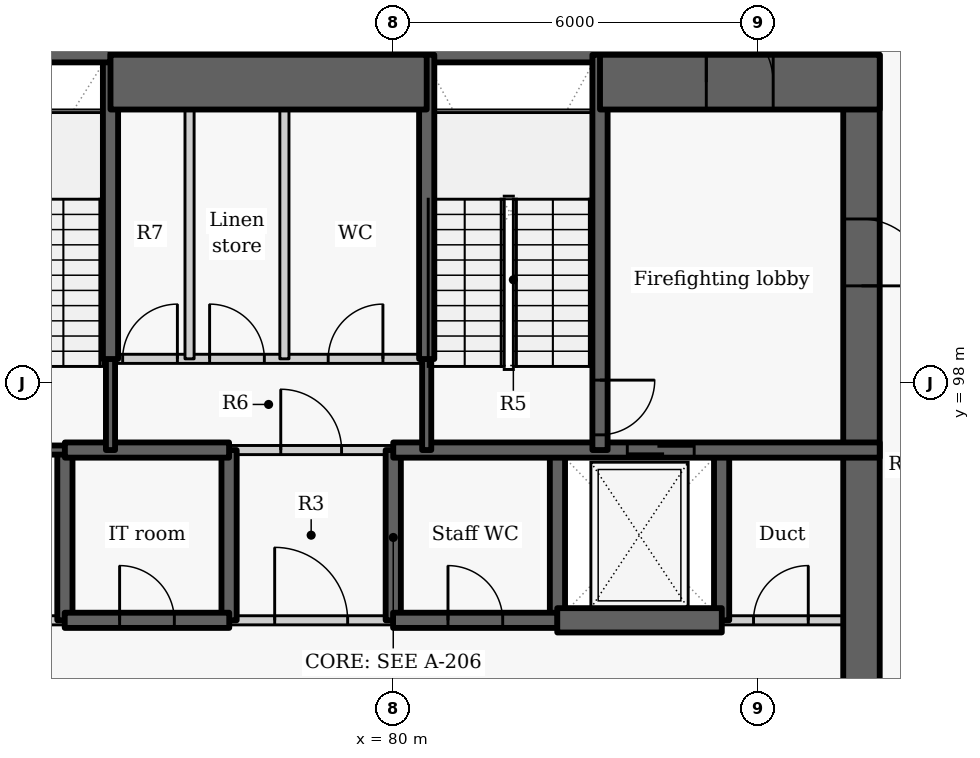
"""IFC4 building model, lengths in metres.
Left out: names, types, materials, properties, quantities, classifications, styles, units other than length and angle.
Written with IfcOpenShell. Run it as: python <this file> out.ifc"""

import sys

from ifc_helpers import new_model, si_unit, direction, frame, frame_2d, origin, place, context, subcontext, project, spatial, rectangle, extrude, element, fill, save


model = new_model("IFC4")
c1 = context("Model", 3, precision=1e-05, world=origin(), true_north=direction((0.0, 1.0)))
c2 = subcontext(c1, "Body", "Model", "MODEL_VIEW")
j1 = project(units=[si_unit("LENGTHUNIT", "METRE"), si_unit("PLANEANGLEUNIT", "RADIAN")], contexts=[c1])
p1 = place(None, origin())
s1 = spatial("IfcSite", under=j1, at=p1, CompositionType="ELEMENT")
p2 = place(p1, origin())
s2 = spatial("IfcBuilding", under=s1, at=p2, CompositionType="ELEMENT")
p3 = place(p2, frame((0.0, 0.0, 24.0)))
s3 = spatial("IfcBuildingStorey", under=s2, at=p3, CompositionType="ELEMENT", Elevation=24.0)
for number, where, z_axis, x_axis in (
    (1, (74.6, 94.1, -0.3), (0.0, 0.0, 1.0), (0.0, 1.0, 0.0)),
    (2, (77.3, 94.1, -0.3), (0.0, 0.0, 1.0), (0.0, 1.0, 0.0)),
    (3, (80.0, 94.1, -0.3), (0.0, 0.0, 1.0), (0.0, 1.0, 0.0)),
    (4, (82.7, 94.1, -0.3), (0.0, 0.0, 1.0), (0.0, 1.0, 0.0)),
    (5, (85.4, 94.1, -0.3), (0.0, 0.0, 1.0), (0.0, 1.0, 0.0)),
):
    element("IfcWall", number, at=place(p3, frame(where, z_axis=z_axis, x_axis=x_axis)), inside=s3, PredefinedType="SHEAR", context=c2, shape_type="SweptSolid", body=[
        extrude(rectangle(XDim=2.8, YDim=0.25, at=frame_2d((1.4, 0.0))), origin(), (0.0, 0.0, 1.0), 4.225),
    ])
p4 = place(p3, frame((87.7, 103.4, -0.3), z_axis=(0.0, 0.0, 1.0), x_axis=(0.0, -1.0, 0.0)))
e6 = element("IfcWall", 6, at=p4, inside=s3, PredefinedType="SHEAR", context=c2, shape_type="SweptSolid", body=[
    extrude(rectangle(XDim=15.6, YDim=0.6, at=frame_2d((7.8, 0.0))), origin(), (0.0, 0.0, 1.0), 4.225),
])
p5 = place(p4, frame((2.7, 0.0, 0.3)))
e7 = element("IfcOpeningElement", 7, at=p5, cuts=e6, PredefinedType="OPENING", context=c2, shape_type="SweptSolid", body=[
    extrude(rectangle(XDim=1.1, YDim=2.1, at=frame_2d((0.55, 1.05))), frame((0.0, 0.31, 0.0), z_axis=(0.0, -1.0, 0.0), x_axis=(1.0, 0.0, 0.0)), (0.0, 0.0, 1.0), 0.62),
])
p6 = place(p3, frame((72.0, 94.1, 0.0), z_axis=(0.0, 0.0, 1.0), x_axis=(1.0, 0.0, 0.0)))
e8 = element("IfcWall", 8, at=p6, inside=s3, PredefinedType="PARTITIONING", context=c2, shape_type="SweptSolid", body=[
    extrude(rectangle(XDim=2.603, YDim=0.15, at=frame_2d((1.302, 0.0))), origin(), (0.0, 0.0, 1.0), 3.925),
])
p7 = place(p6, frame((1.075, 0.0, 0.0)))
e9 = element("IfcOpeningElement", 9, at=p7, cuts=e8, PredefinedType="OPENING", context=c2, shape_type="SweptSolid", body=[
    extrude(rectangle(XDim=1.1, YDim=2.1, at=frame_2d((0.55, 1.05))), frame((0.0, 0.085, 0.0), z_axis=(0.0, -1.0, 0.0), x_axis=(1.0, 0.0, 0.0)), (0.0, 0.0, 1.0), 0.17),
])
p8 = place(p3, frame((77.297, 94.1, 0.0), z_axis=(0.0, 0.0, 1.0), x_axis=(1.0, 0.0, 0.0)))
e10 = element("IfcWall", 10, at=p8, inside=s3, PredefinedType="PARTITIONING", context=c2, shape_type="SweptSolid", body=[
    extrude(rectangle(XDim=2.706, YDim=0.15, at=frame_2d((1.353, 0.0))), origin(), (0.0, 0.0, 1.0), 3.925),
])
p9 = place(p8, frame((0.753, 0.0, 0.0)))
e11 = element("IfcOpeningElement", 11, at=p9, cuts=e10, PredefinedType="OPENING", context=c2, shape_type="SweptSolid", body=[
    extrude(rectangle(XDim=1.2, YDim=2.1, at=frame_2d((0.6, 1.05))), frame((0.0, 0.085, 0.0), z_axis=(0.0, -1.0, 0.0), x_axis=(1.0, 0.0, 0.0)), (0.0, 0.0, 1.0), 0.17),
])
p10 = place(p3, frame((85.397, 94.1, 0.0), z_axis=(0.0, 0.0, 1.0), x_axis=(1.0, 0.0, 0.0)))
e12 = element("IfcWall", 12, at=p10, inside=s3, PredefinedType="PARTITIONING", context=c2, shape_type="SweptSolid", body=[
    extrude(rectangle(XDim=2.603, YDim=0.15, at=frame_2d((1.302, 0.0))), origin(), (0.0, 0.0, 1.0), 3.925),
])
p11 = place(p10, frame((0.528, 0.0, 0.0)))
e13 = element("IfcOpeningElement", 13, at=p11, cuts=e12, PredefinedType="OPENING", context=c2, shape_type="SweptSolid", body=[
    extrude(rectangle(XDim=0.9, YDim=2.1, at=frame_2d((0.45, 1.05))), frame((0.0, 0.085, 0.0), z_axis=(0.0, -1.0, 0.0), x_axis=(1.0, 0.0, 0.0)), (0.0, 0.0, 1.0), 0.17),
])
p12 = place(p3, frame((74.597, 94.1, -0.3), z_axis=(0.0, 0.0, 1.0), x_axis=(1.0, 0.0, 0.0)))
e14 = element("IfcWall", 14, at=p12, inside=s3, PredefinedType="SHEAR", context=c2, shape_type="SweptSolid", body=[
    extrude(rectangle(XDim=2.706, YDim=0.25, at=frame_2d((1.353, 0.0))), origin(), (0.0, 0.0, 1.0), 4.225),
])
p13 = place(p12, frame((0.903, 0.0, 0.3)))
e15 = element("IfcOpeningElement", 15, at=p13, cuts=e14, PredefinedType="OPENING", context=c2, shape_type="SweptSolid", body=[
    extrude(rectangle(XDim=0.9, YDim=2.1, at=frame_2d((0.45, 1.05))), frame((0.0, 0.135, 0.0), z_axis=(0.0, -1.0, 0.0), x_axis=(1.0, 0.0, 0.0)), (0.0, 0.0, 1.0), 0.27),
])
p14 = place(p3, frame((79.997, 94.1, -0.3), z_axis=(0.0, 0.0, 1.0), x_axis=(1.0, 0.0, 0.0)))
e16 = element("IfcWall", 16, at=p14, inside=s3, PredefinedType="SHEAR", context=c2, shape_type="SweptSolid", body=[
    extrude(rectangle(XDim=2.706, YDim=0.25, at=frame_2d((1.353, 0.0))), origin(), (0.0, 0.0, 1.0), 4.225),
])
p15 = place(p14, frame((0.903, 0.0, 0.3)))
e17 = element("IfcOpeningElement", 17, at=p15, cuts=e16, PredefinedType="OPENING", context=c2, shape_type="SweptSolid", body=[
    extrude(rectangle(XDim=0.9, YDim=2.1, at=frame_2d((0.45, 1.05))), frame((0.0, 0.135, 0.0), z_axis=(0.0, -1.0, 0.0), x_axis=(1.0, 0.0, 0.0)), (0.0, 0.0, 1.0), 0.27),
])
p16 = place(p3, frame((82.697, 94.1, -0.3), z_axis=(0.0, 0.0, 1.0), x_axis=(1.0, 0.0, 0.0)))
e18 = element("IfcWall", 18, at=p16, inside=s3, PredefinedType="SHEAR", context=c2, shape_type="SweptSolid", body=[
    extrude(rectangle(XDim=2.706, YDim=0.4, at=frame_2d((1.353, 0.0))), origin(), (0.0, 0.0, 1.0), 4.225),
])
p17 = place(p3, frame((74.6, 96.9, -0.3), z_axis=(0.0, 0.0, 1.0), x_axis=(-1.0, 0.0, 0.0)))
e19 = element("IfcWall", 19, at=p17, inside=s3, PredefinedType="SHEAR", context=c2, shape_type="SweptSolid", body=[
    extrude(rectangle(XDim=2.6, YDim=0.15, at=frame_2d((1.3, 0.0))), origin(), (0.0, 0.0, 1.0), 4.225),
])
p18 = place(p17, frame((0.37, 0.0, 0.3)))
e20 = element("IfcOpeningElement", 20, at=p18, cuts=e19, PredefinedType="OPENING", context=c2, shape_type="SweptSolid", body=[
    extrude(rectangle(XDim=1.1, YDim=2.1, at=frame_2d((0.55, 1.05))), frame((0.0, 0.085, 0.0), z_axis=(0.0, -1.0, 0.0), x_axis=(1.0, 0.0, 0.0)), (0.0, 0.0, 1.0), 0.17),
])
p19 = place(p3, frame((74.6, 96.9, -0.3), z_axis=(0.0, 0.0, 1.0), x_axis=(1.0, 0.0, 0.0)))
e21 = element("IfcWall", 21, at=p19, inside=s3, PredefinedType="SHEAR", context=c2, shape_type="SweptSolid", body=[
    extrude(rectangle(XDim=2.7, YDim=0.25, at=frame_2d((1.35, 0.0))), origin(), (0.0, 0.0, 1.0), 4.225),
])
p20 = place(p3, frame((80.0, 96.9, -0.3), z_axis=(0.0, 0.0, 1.0), x_axis=(1.0, 0.0, 0.0)))
e22 = element("IfcWall", 22, at=p20, inside=s3, PredefinedType="SHEAR", context=c2, shape_type="SweptSolid", body=[
    extrude(rectangle(XDim=8.0, YDim=0.25, at=frame_2d((4.0, 0.0))), origin(), (0.0, 0.0, 1.0), 4.225),
])
p21 = place(p20, frame((3.849, 0.0, 0.3)))
e23 = element("IfcOpeningElement", 23, at=p21, cuts=e22, PredefinedType="OPENING", context=c2, shape_type="SweptSolid", body=[
    extrude(rectangle(XDim=1.1, YDim=2.1, at=frame_2d((0.55, 1.05))), frame((0.0, 0.135, 0.0), z_axis=(0.0, -1.0, 0.0), x_axis=(1.0, 0.0, 0.0)), (0.0, 0.0, 1.0), 0.27),
])
p22 = place(p3, frame((77.3, 96.9, 0.0), z_axis=(0.0, 0.0, 1.0), x_axis=(1.0, 0.0, 0.0)))
e24 = element("IfcWall", 24, at=p22, inside=s3, PredefinedType="PARTITIONING", context=c2, shape_type="SweptSolid", body=[
    extrude(rectangle(XDim=2.7, YDim=0.15, at=frame_2d((1.35, 0.0))), origin(), (0.0, 0.0, 1.0), 3.925),
])
p23 = place(p22, frame((0.85, 0.0, 0.0)))
e25 = element("IfcOpeningElement", 25, at=p23, cuts=e24, PredefinedType="OPENING", context=c2, shape_type="SweptSolid", body=[
    extrude(rectangle(XDim=1.0, YDim=2.1, at=frame_2d((0.5, 1.05))), frame((0.0, 0.085, 0.0), z_axis=(0.0, -1.0, 0.0), x_axis=(1.0, 0.0, 0.0)), (0.0, 0.0, 1.0), 0.17),
])
p24 = place(p3, frame((75.35, 96.9, -0.3), z_axis=(0.0, 0.0, 1.0), x_axis=(0.0, 1.0, 0.0)))
e26 = element("IfcWall", 26, at=p24, inside=s3, PredefinedType="SHEAR", context=c2, shape_type="SweptSolid", body=[
    extrude(rectangle(XDim=1.503, YDim=0.15, at=frame_2d((0.751, 0.0))), origin(), (0.0, 0.0, 1.0), 4.225),
])
p25 = place(p3, frame((75.35, 98.397, -0.3), z_axis=(0.0, 0.0, 1.0), x_axis=(0.0, 1.0, 0.0)))
e27 = element("IfcWall", 27, at=p25, inside=s3, PredefinedType="SHEAR", context=c2, shape_type="SweptSolid", body=[
    extrude(rectangle(XDim=5.003, YDim=0.25, at=frame_2d((2.501, 0.0))), origin(), (0.0, 0.0, 1.0), 4.225),
])
p26 = place(p3, frame((72.0, 103.4, -0.3), z_axis=(0.0, 0.0, 1.0), x_axis=(1.0, 0.0, 0.0)))
e28 = element("IfcWall", 28, at=p26, inside=s3, PredefinedType="SHEAR", context=c2, shape_type="SweptSolid", body=[
    extrude(rectangle(XDim=3.35, YDim=0.25, at=frame_2d((1.675, 0.0))), origin(), (0.0, 0.0, 1.0), 4.225),
])
p27 = place(p3, frame((80.55, 103.4, -0.3), z_axis=(0.0, 0.0, 1.0), x_axis=(1.0, 0.0, 0.0)))
e29 = element("IfcWall", 29, at=p27, inside=s3, PredefinedType="SHEAR", context=c2, shape_type="SweptSolid", body=[
    extrude(rectangle(XDim=2.85, YDim=0.25, at=frame_2d((1.425, 0.0))), origin(), (0.0, 0.0, 1.0), 4.225),
])
p28 = place(p3, frame((83.4, 103.4, -0.3), z_axis=(0.0, 0.0, 1.0), x_axis=(0.0, -1.0, 0.0)))
e30 = element("IfcWall", 30, at=p28, inside=s3, PredefinedType="SHEAR", context=c2, shape_type="SweptSolid", body=[
    extrude(rectangle(XDim=6.5, YDim=0.25, at=frame_2d((3.25, 0.0))), origin(), (0.0, 0.0, 1.0), 4.225),
])
p29 = place(p28, frame((5.35, 0.0, 0.3)))
e31 = element("IfcOpeningElement", 31, at=p29, cuts=e30, PredefinedType="OPENING", context=c2, shape_type="SweptSolid", body=[
    extrude(rectangle(XDim=0.9, YDim=2.1, at=frame_2d((0.45, 1.05))), frame((0.0, 0.135, 0.0), z_axis=(0.0, -1.0, 0.0), x_axis=(1.0, 0.0, 0.0)), (0.0, 0.0, 1.0), 0.27),
])
p30 = place(p3, frame((80.55, 96.9, -0.3), z_axis=(0.0, 0.0, 1.0), x_axis=(0.0, 1.0, 0.0)))
e32 = element("IfcWall", 32, at=p30, inside=s3, PredefinedType="SHEAR", context=c2, shape_type="SweptSolid", body=[
    extrude(rectangle(XDim=1.503, YDim=0.15, at=frame_2d((0.751, 0.0))), origin(), (0.0, 0.0, 1.0), 4.225),
])
p31 = place(p3, frame((80.55, 98.397, -0.3), z_axis=(0.0, 0.0, 1.0), x_axis=(0.0, 1.0, 0.0)))
e33 = element("IfcWall", 33, at=p31, inside=s3, PredefinedType="SHEAR", context=c2, shape_type="SweptSolid", body=[
    extrude(rectangle(XDim=5.003, YDim=0.25, at=frame_2d((2.501, 0.0))), origin(), (0.0, 0.0, 1.0), 4.225),
])
p32 = place(p3, frame((75.35, 102.95, -0.3), z_axis=(0.0, 0.0, 1.0), x_axis=(1.0, 0.0, 0.0)))
e34 = element("IfcWall", 34, at=p32, inside=s3, PredefinedType="SHEAR", context=c2, shape_type="SweptSolid", body=[
    extrude(rectangle(XDim=5.2, YDim=0.9, at=frame_2d((2.6, 0.0))), origin(), (0.0, 0.0, 1.0), 4.225),
])
p33 = place(p3, frame((83.4, 102.95, -0.3), z_axis=(0.0, 0.0, 1.0), x_axis=(1.0, 0.0, 0.0)))
e35 = element("IfcWall", 35, at=p33, inside=s3, PredefinedType="SHEAR", context=c2, shape_type="SweptSolid", body=[
    extrude(rectangle(XDim=4.6, YDim=0.9, at=frame_2d((2.3, 0.0))), origin(), (0.0, 0.0, 1.0), 4.225),
])
p34 = place(p33, frame((1.748, 0.0, 0.3)))
e36 = element("IfcOpeningElement", 36, at=p34, cuts=e35, PredefinedType="OPENING", context=c2, shape_type="SweptSolid", body=[
    extrude(rectangle(XDim=1.1, YDim=2.1, at=frame_2d((0.55, 1.05))), frame((0.0, 0.46, 0.0), z_axis=(0.0, -1.0, 0.0), x_axis=(1.0, 0.0, 0.0)), (0.0, 0.0, 1.0), 0.92),
])
p35 = place(p3, frame((75.35, 98.4, 0.0), z_axis=(0.0, 0.0, 1.0), x_axis=(1.0, 0.0, 0.0)))
e37 = element("IfcWall", 37, at=p35, inside=s3, PredefinedType="PARTITIONING", context=c2, shape_type="SweptSolid", body=[
    extrude(rectangle(XDim=5.2, YDim=0.15, at=frame_2d((2.6, 0.0))), origin(), (0.0, 0.0, 1.0), 3.925),
])
p36 = place(p35, frame((0.2, 0.0, 0.0)))
e38 = element("IfcOpeningElement", 38, at=p36, cuts=e37, PredefinedType="OPENING", context=c2, shape_type="SweptSolid", body=[
    extrude(rectangle(XDim=0.9, YDim=2.1, at=frame_2d((0.45, 1.05))), frame((0.0, 0.085, 0.0), z_axis=(0.0, -1.0, 0.0), x_axis=(1.0, 0.0, 0.0)), (0.0, 0.0, 1.0), 0.17),
])
p37 = place(p35, frame((1.63, 0.0, 0.0)))
e39 = element("IfcOpeningElement", 39, at=p37, cuts=e37, PredefinedType="OPENING", context=c2, shape_type="SweptSolid", body=[
    extrude(rectangle(XDim=0.9, YDim=2.1, at=frame_2d((0.45, 1.05))), frame((0.0, 0.085, 0.0), z_axis=(0.0, -1.0, 0.0), x_axis=(1.0, 0.0, 0.0)), (0.0, 0.0, 1.0), 0.17),
])
p38 = place(p35, frame((3.58, 0.0, 0.0)))
e40 = element("IfcOpeningElement", 40, at=p38, cuts=e37, PredefinedType="OPENING", context=c2, shape_type="SweptSolid", body=[
    extrude(rectangle(XDim=0.9, YDim=2.1, at=frame_2d((0.45, 1.05))), frame((0.0, 0.085, 0.0), z_axis=(0.0, -1.0, 0.0), x_axis=(1.0, 0.0, 0.0)), (0.0, 0.0, 1.0), 0.17),
])
for number, where, z_axis, x_axis in (
    (41, (76.65, 98.4, 0.0), (0.0, 0.0, 1.0), (0.0, 1.0, 0.0)),
    (42, (78.21, 98.4, 0.0), (0.0, 0.0, 1.0), (0.0, 1.0, 0.0)),
):
    element("IfcWall", number, at=place(p3, frame(where, z_axis=z_axis, x_axis=x_axis)), inside=s3, PredefinedType="PARTITIONING", context=c2, shape_type="SweptSolid", body=[
        extrude(rectangle(XDim=5.0, YDim=0.15, at=frame_2d((2.5, 0.0))), origin(), (0.0, 0.0, 1.0), 3.925),
    ])
p39 = place(p13, origin())
e43 = element("IfcDoor", 43, at=p39, inside=s3, OperationType="SINGLE_SWING_LEFT", PredefinedType="DOOR", context=c2, shape_type="SweptSolid", body=[
    extrude(rectangle(XDim=0.9, YDim=2.1, at=frame_2d((0.45, 1.05))), frame((0.0, 0.025, 0.0), z_axis=(0.0, -1.0, 0.0), x_axis=(1.0, 0.0, 0.0)), (0.0, 0.0, 1.0), 0.05),
])
fill(e15, e43)
p40 = place(p9, origin())
e44 = element("IfcDoor", 44, at=p40, inside=s3, OperationType="DOUBLE_DOOR_SINGLE_SWING", PredefinedType="DOOR", context=c2, shape_type="SweptSolid", body=[
    extrude(rectangle(XDim=1.2, YDim=2.1, at=frame_2d((0.6, 1.05))), frame((0.0, 0.025, 0.0), z_axis=(0.0, -1.0, 0.0), x_axis=(1.0, 0.0, 0.0)), (0.0, 0.0, 1.0), 0.05),
])
fill(e11, e44)
p41 = place(p15, origin())
e45 = element("IfcDoor", 45, at=p41, inside=s3, OperationType="SINGLE_SWING_LEFT", PredefinedType="DOOR", context=c2, shape_type="SweptSolid", body=[
    extrude(rectangle(XDim=0.9, YDim=2.1, at=frame_2d((0.45, 1.05))), frame((0.0, 0.025, 0.0), z_axis=(0.0, -1.0, 0.0), x_axis=(1.0, 0.0, 0.0)), (0.0, 0.0, 1.0), 0.05),
])
fill(e17, e45)
p42 = place(p21, origin())
e46 = element("IfcDoor", 46, at=p42, inside=s3, OperationType="SLIDING_TO_LEFT", PredefinedType="DOOR", context=c2, shape_type="SweptSolid", body=[
    extrude(rectangle(XDim=1.1, YDim=2.1, at=frame_2d((0.55, 1.05))), frame((0.0, 0.025, 0.0), z_axis=(0.0, -1.0, 0.0), x_axis=(1.0, 0.0, 0.0)), (0.0, 0.0, 1.0), 0.05),
])
fill(e23, e46)
p43 = place(p11, origin())
e47 = element("IfcDoor", 47, at=p43, inside=s3, OperationType="SINGLE_SWING_RIGHT", PredefinedType="DOOR", context=c2, shape_type="SweptSolid", body=[
    extrude(rectangle(XDim=0.9, YDim=2.1, at=frame_2d((0.45, 1.05))), frame((0.0, 0.025, 0.0), z_axis=(0.0, -1.0, 0.0), x_axis=(1.0, 0.0, 0.0)), (0.0, 0.0, 1.0), 0.05),
])
fill(e13, e47)
p44 = place(p23, origin())
e48 = element("IfcDoor", 48, at=p44, inside=s3, OperationType="SINGLE_SWING_LEFT", PredefinedType="DOOR", context=c2, shape_type="SweptSolid", body=[
    extrude(rectangle(XDim=1.0, YDim=2.1, at=frame_2d((0.5, 1.05))), frame((0.0, 0.025, 0.0), z_axis=(0.0, -1.0, 0.0), x_axis=(1.0, 0.0, 0.0)), (0.0, 0.0, 1.0), 0.05),
])
fill(e25, e48)
p45 = place(p36, origin())
e49 = element("IfcDoor", 49, at=p45, inside=s3, OperationType="SINGLE_SWING_RIGHT", PredefinedType="DOOR", context=c2, shape_type="SweptSolid", body=[
    extrude(rectangle(XDim=0.9, YDim=2.1, at=frame_2d((0.45, 1.05))), frame((0.0, 0.025, 0.0), z_axis=(0.0, -1.0, 0.0), x_axis=(1.0, 0.0, 0.0)), (0.0, 0.0, 1.0), 0.05),
])
fill(e38, e49)
p46 = place(p37, origin())
e50 = element("IfcDoor", 50, at=p46, inside=s3, OperationType="SINGLE_SWING_LEFT", PredefinedType="DOOR", context=c2, shape_type="SweptSolid", body=[
    extrude(rectangle(XDim=0.9, YDim=2.1, at=frame_2d((0.45, 1.05))), frame((0.0, 0.025, 0.0), z_axis=(0.0, -1.0, 0.0), x_axis=(1.0, 0.0, 0.0)), (0.0, 0.0, 1.0), 0.05),
])
fill(e39, e50)
p47 = place(p38, origin())
e51 = element("IfcDoor", 51, at=p47, inside=s3, OperationType="SINGLE_SWING_RIGHT", PredefinedType="DOOR", context=c2, shape_type="SweptSolid", body=[
    extrude(rectangle(XDim=0.9, YDim=2.1, at=frame_2d((0.45, 1.05))), frame((0.0, 0.025, 0.0), z_axis=(0.0, -1.0, 0.0), x_axis=(1.0, 0.0, 0.0)), (0.0, 0.0, 1.0), 0.05),
])
fill(e40, e51)
p48 = place(p29, origin())
e52 = element("IfcDoor", 52, at=p48, inside=s3, OperationType="SINGLE_SWING_LEFT", PredefinedType="DOOR", context=c2, shape_type="SweptSolid", body=[
    extrude(rectangle(XDim=0.9, YDim=2.1, at=frame_2d((0.45, 1.05))), frame((0.0, 0.025, 0.0), z_axis=(0.0, -1.0, 0.0), x_axis=(1.0, 0.0, 0.0)), (0.0, 0.0, 1.0), 0.05),
])
fill(e31, e52)
p49 = place(p5, origin())
e53 = element("IfcDoor", 53, at=p49, inside=s3, OperationType="SINGLE_SWING_RIGHT", PredefinedType="DOOR", context=c2, shape_type="SweptSolid", body=[
    extrude(rectangle(XDim=1.1, YDim=2.1, at=frame_2d((0.55, 1.05))), frame((0.0, 0.025, 0.0), z_axis=(0.0, -1.0, 0.0), x_axis=(1.0, 0.0, 0.0)), (0.0, 0.0, 1.0), 0.05),
])
fill(e7, e53)
p50 = place(p34, origin())
e54 = element("IfcDoor", 54, at=p50, inside=s3, OperationType="SINGLE_SWING_LEFT", PredefinedType="DOOR", context=c2, shape_type="SweptSolid", body=[
    extrude(rectangle(XDim=1.1, YDim=2.1, at=frame_2d((0.55, 1.05))), frame((0.0, 0.025, 0.0), z_axis=(0.0, -1.0, 0.0), x_axis=(1.0, 0.0, 0.0)), (0.0, 0.0, 1.0), 0.05),
])
fill(e36, e54)
save(model, sys.argv[1])
